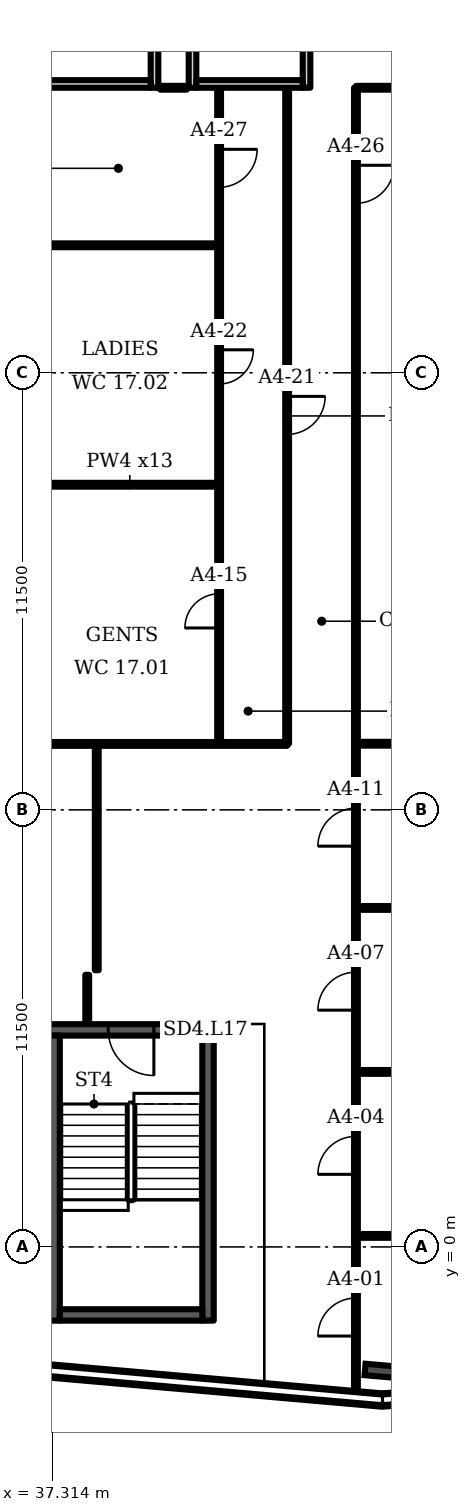
"""IFC4 building model, lengths in metres.
Left out: names, types, materials, properties, quantities, classifications, styles, units other than length and angle.
Written with IfcOpenShell. Run it as: python <this file> out.ifc"""

import sys

from ifc_helpers import new_model, si_unit, direction, frame, frame_2d, origin, origin_2d, place, context, subcontext, project, spatial, rectangle, i_section, extrude, element, fill, save


model = new_model("IFC4")
c1 = context("Model", 3, precision=1e-05, world=origin(), true_north=direction((0.0, 1.0)))
c2 = subcontext(c1, "Body", "Model", "MODEL_VIEW")
j1 = project(units=[si_unit("LENGTHUNIT", "METRE"), si_unit("PLANEANGLEUNIT", "RADIAN")], contexts=[c1])
p1 = place(None, origin())
s1 = spatial("IfcSite", under=j1, at=p1, CompositionType="ELEMENT")
p2 = place(p1, origin())
s2 = spatial("IfcBuilding", under=s1, at=p2, CompositionType="ELEMENT")
p3 = place(p2, frame((0.0, 0.0, 81.1)))
s3 = spatial("IfcBuildingStorey", under=s2, at=p3, CompositionType="ELEMENT", Elevation=81.1)
p4 = place(p3, frame((46.042, -3.268, 0.0), z_axis=(0.0, 0.0, 1.0), x_axis=(-0.087156, -0.996198, 0.0)))
e1 = element("IfcColumn", 1, at=p4, inside=s3, PredefinedType="COLUMN", context=c2, shape_type="SweptSolid", body=[
    extrude(i_section(OverallWidth=0.302, OverallDepth=1.008, WebThickness=0.021, FlangeThickness=0.04, FilletRadius=0.03, at=origin_2d()), origin(), (0.0, 0.0, 1.0), 3.6),
])
p5 = place(p3, frame((34.601, -3.032, 0.0), z_axis=(0.0, 0.0, 1.0), x_axis=(0.996193, -0.087148, 0.0)))
e2 = element("IfcWall", 2, at=p5, inside=s3, PredefinedType="SOLIDWALL", context=c2, shape_type="SweptSolid", body=[
    extrude(rectangle(XDim=11.458, YDim=0.35, at=frame_2d((5.729, 0.0))), origin(), (0.0, 0.0, 1.0), 1.0),
])
p6 = place(p3, frame((46.045, -4.026, 0.0), z_axis=(0.0, 0.0, 1.0), x_axis=(0.99619, 0.087163, 0.0)))
e3 = element("IfcWall", 3, at=p6, inside=s3, PredefinedType="SOLIDWALL", context=c2, shape_type="SweptSolid", body=[
    extrude(rectangle(XDim=23.013, YDim=0.35, at=frame_2d((11.506, 0.0))), origin(), (0.0, 0.0, 1.0), 1.0),
])
p7 = place(p3, frame((40.0, 30.5, 0.0), z_axis=(0.0, 0.0, 1.0), x_axis=(0.0, 1.0, 0.0)))
e4 = element("IfcWall", 4, at=p7, inside=s3, PredefinedType="PARTITIONING", context=c2, shape_type="SweptSolid", body=[
    extrude(rectangle(XDim=3.5, YDim=0.2, at=frame_2d((1.75, 0.0))), origin(), (0.0, 0.0, 1.0), 3.2),
])
p8 = place(p3, frame((37.1, 30.6, 0.0), z_axis=(0.0, 0.0, 1.0), x_axis=(1.0, 0.0, 0.0)))
e5 = element("IfcWall", 5, at=p8, inside=s3, PredefinedType="PARTITIONING", context=c2, shape_type="SweptSolid", body=[
    extrude(rectangle(XDim=2.8, YDim=0.2, at=frame_2d((1.4, 0.0))), origin(), (0.0, 0.0, 1.0), 3.2),
])
p9 = place(p3, frame((41.0, 30.5, 0.0), z_axis=(0.0, 0.0, 1.0), x_axis=(0.0, 1.0, 0.0)))
e6 = element("IfcWall", 6, at=p9, inside=s3, PredefinedType="PARTITIONING", context=c2, shape_type="SweptSolid", body=[
    extrude(rectangle(XDim=3.5, YDim=0.2, at=frame_2d((1.75, 0.0))), origin(), (0.0, 0.0, 1.0), 3.2),
])
p10 = place(p3, frame((44.0, 30.5, 0.0), z_axis=(0.0, 0.0, 1.0), x_axis=(0.0, 1.0, 0.0)))
e7 = element("IfcWall", 7, at=p10, inside=s3, PredefinedType="PARTITIONING", context=c2, shape_type="SweptSolid", body=[
    extrude(rectangle(XDim=3.5, YDim=0.2, at=frame_2d((1.75, 0.0))), origin(), (0.0, 0.0, 1.0), 3.2),
])
p11 = place(p10, frame((1.2, 0.0, 0.0)))
e8 = element("IfcOpeningElement", 8, at=p11, cuts=e7, PredefinedType="OPENING", context=c2, shape_type="SweptSolid", body=[
    extrude(rectangle(XDim=1.1, YDim=2.1, at=frame_2d((0.55, 1.05))), frame((0.0, 0.11, 0.0), z_axis=(0.0, -1.0, 0.0), x_axis=(1.0, 0.0, 0.0)), (0.0, 0.0, 1.0), 0.22),
])
p12 = place(p3, frame((41.1, 30.6, 0.0), z_axis=(0.0, 0.0, 1.0), x_axis=(1.0, 0.0, 0.0)))
e9 = element("IfcWall", 9, at=p12, inside=s3, PredefinedType="PARTITIONING", context=c2, shape_type="SweptSolid", body=[
    extrude(rectangle(XDim=2.8, YDim=0.2, at=frame_2d((1.4, 0.0))), origin(), (0.0, 0.0, 1.0), 3.2),
])
p13 = place(p3, frame((37.208, 5.711, 0.0), z_axis=(0.0, 0.0, 1.0), x_axis=(1.0, 0.0, 0.0)))
e10 = element("IfcWall", 10, at=p13, inside=s3, PredefinedType="SHEAR", context=c2, shape_type="SweptSolid", body=[
    extrude(rectangle(XDim=4.35, YDim=0.3, at=frame_2d((2.175, 0.0))), origin(), (0.0, 0.0, 1.0), 3.2),
])
p14 = place(p13, frame((1.575, 0.0, 0.0)))
e11 = element("IfcOpeningElement", 11, at=p14, cuts=e10, PredefinedType="OPENING", context=c2, shape_type="SweptSolid", body=[
    extrude(rectangle(XDim=1.2, YDim=2.1, at=frame_2d((0.6, 1.05))), frame((0.0, 0.16, 0.0), z_axis=(0.0, -1.0, 0.0), x_axis=(1.0, 0.0, 0.0)), (0.0, 0.0, 1.0), 0.32),
])
p15 = place(p3, frame((37.0, 13.235, 0.0), z_axis=(0.0, 0.0, 1.0), x_axis=(1.0, 0.0, 0.0)))
e12 = element("IfcWall", 12, at=p15, inside=s3, PredefinedType="PARTITIONING", context=c2, shape_type="SweptSolid", body=[
    extrude(rectangle(XDim=6.49, YDim=0.1, at=frame_2d((3.245, 0.0))), origin(), (0.0, 0.0, 1.0), 3.2),
])
for number, where, z_axis, x_axis in (
    (13, (37.0, 20.055, 0.0), (0.0, 0.0, 1.0), (1.0, 0.0, 0.0)),
    (14, (37.0, 26.355, 0.0), (0.0, 0.0, 1.0), (1.0, 0.0, 0.0)),
):
    element("IfcWall", number, at=place(p3, frame(where, z_axis=z_axis, x_axis=x_axis)), inside=s3, PredefinedType="PARTITIONING", context=c2, shape_type="SweptSolid", body=[
        extrude(rectangle(XDim=4.7, YDim=0.1, at=frame_2d((2.35, 0.0))), origin(), (0.0, 0.0, 1.0), 3.2),
    ])
p16 = place(p3, frame((38.23, 5.881, 0.0), z_axis=(0.0, 0.0, 1.0), x_axis=(0.0, 1.0, 0.0)))
e15 = element("IfcWall", 15, at=p16, inside=s3, PredefinedType="PARTITIONING", context=c2, shape_type="SweptSolid", body=[
    extrude(rectangle(XDim=1.279, YDim=0.1, at=frame_2d((0.64, 0.0))), origin(), (0.0, 0.0, 1.0), 3.2),
])
p17 = place(p3, frame((38.48, 7.28, 0.0), z_axis=(0.0, 0.0, 1.0), x_axis=(0.0, 1.0, 0.0)))
e16 = element("IfcWall", 16, at=p17, inside=s3, PredefinedType="PARTITIONING", context=c2, shape_type="SweptSolid", body=[
    extrude(rectangle(XDim=5.955, YDim=0.1, at=frame_2d((2.978, 0.0))), origin(), (0.0, 0.0, 1.0), 3.2),
])
p18 = place(p3, frame((41.7, 13.24, 0.0), z_axis=(0.0, 0.0, 1.0), x_axis=(0.0, 1.0, 0.0)))
e17 = element("IfcWall", 17, at=p18, inside=s3, PredefinedType="PARTITIONING", context=c2, shape_type="SweptSolid", body=[
    extrude(rectangle(XDim=17.25, YDim=0.1, at=frame_2d((8.625, 0.0))), origin(), (0.0, 0.0, 1.0), 3.2),
])
p19 = place(p18, frame((3.046, 0.0, 0.0)))
e18 = element("IfcOpeningElement", 18, at=p19, cuts=e17, PredefinedType="OPENING", context=c2, shape_type="SweptSolid", body=[
    extrude(rectangle(XDim=0.9, YDim=2.1, at=frame_2d((0.45, 1.05))), frame((0.0, 0.06, 0.0), z_axis=(0.0, -1.0, 0.0), x_axis=(1.0, 0.0, 0.0)), (0.0, 0.0, 1.0), 0.12),
])
p20 = place(p18, frame((9.465, 0.0, 0.0)))
e19 = element("IfcOpeningElement", 19, at=p20, cuts=e17, PredefinedType="OPENING", context=c2, shape_type="SweptSolid", body=[
    extrude(rectangle(XDim=0.9, YDim=2.1, at=frame_2d((0.45, 1.05))), frame((0.0, 0.06, 0.0), z_axis=(0.0, -1.0, 0.0), x_axis=(1.0, 0.0, 0.0)), (0.0, 0.0, 1.0), 0.12),
])
p21 = place(p18, frame((14.64, 0.0, 0.0)))
e20 = element("IfcOpeningElement", 20, at=p21, cuts=e17, PredefinedType="OPENING", context=c2, shape_type="SweptSolid", body=[
    extrude(rectangle(XDim=1.0, YDim=2.1, at=frame_2d((0.5, 1.05))), frame((0.0, 0.06, 0.0), z_axis=(0.0, -1.0, 0.0), x_axis=(1.0, 0.0, 0.0)), (0.0, 0.0, 1.0), 0.12),
])
p22 = place(p3, frame((43.49, 13.24, 0.0), z_axis=(0.0, 0.0, 1.0), x_axis=(0.0, 1.0, 0.0)))
e21 = element("IfcWall", 21, at=p22, inside=s3, PredefinedType="PARTITIONING", context=c2, shape_type="SweptSolid", body=[
    extrude(rectangle(XDim=17.25, YDim=0.1, at=frame_2d((8.625, 0.0))), origin(), (0.0, 0.0, 1.0), 3.2),
])
p23 = place(p22, frame((8.139, 0.0, 0.0)))
e22 = element("IfcOpeningElement", 22, at=p23, cuts=e21, PredefinedType="OPENING", context=c2, shape_type="SweptSolid", body=[
    extrude(rectangle(XDim=1.0, YDim=2.1, at=frame_2d((0.5, 1.05))), frame((0.0, 0.06, 0.0), z_axis=(0.0, -1.0, 0.0), x_axis=(1.0, 0.0, 0.0)), (0.0, 0.0, 1.0), 0.12),
])
p24 = place(p3, frame((45.3, -3.943, 0.0), z_axis=(0.0, 0.0, 1.0), x_axis=(0.0, 1.0, 0.0)))
e23 = element("IfcWall", 23, at=p24, inside=s3, PredefinedType="PARTITIONING", context=c2, shape_type="SweptSolid", body=[
    extrude(rectangle(XDim=34.443, YDim=0.1, at=frame_2d((17.222, 0.0))), origin(), (0.0, 0.0, 1.0), 2.58),
])
p25 = place(p24, frame((1.598, 0.0, 0.0)))
e24 = element("IfcOpeningElement", 24, at=p25, cuts=e23, PredefinedType="OPENING", context=c2, shape_type="SweptSolid", body=[
    extrude(rectangle(XDim=1.0, YDim=2.1, at=frame_2d((0.5, 1.05))), frame((0.0, 0.06, 0.0), z_axis=(0.0, -1.0, 0.0), x_axis=(1.0, 0.0, 0.0)), (0.0, 0.0, 1.0), 0.12),
])
p26 = place(p24, frame((5.853, 0.0, 0.0)))
e25 = element("IfcOpeningElement", 25, at=p26, cuts=e23, PredefinedType="OPENING", context=c2, shape_type="SweptSolid", body=[
    extrude(rectangle(XDim=1.0, YDim=2.1, at=frame_2d((0.5, 1.05))), frame((0.0, 0.06, 0.0), z_axis=(0.0, -1.0, 0.0), x_axis=(1.0, 0.0, 0.0)), (0.0, 0.0, 1.0), 0.12),
])
p27 = place(p24, frame((10.173, 0.0, 0.0)))
e26 = element("IfcOpeningElement", 26, at=p27, cuts=e23, PredefinedType="OPENING", context=c2, shape_type="SweptSolid", body=[
    extrude(rectangle(XDim=1.0, YDim=2.1, at=frame_2d((0.5, 1.05))), frame((0.0, 0.06, 0.0), z_axis=(0.0, -1.0, 0.0), x_axis=(1.0, 0.0, 0.0)), (0.0, 0.0, 1.0), 0.12),
])
p28 = place(p24, frame((14.488, 0.0, 0.0)))
e27 = element("IfcOpeningElement", 27, at=p28, cuts=e23, PredefinedType="OPENING", context=c2, shape_type="SweptSolid", body=[
    extrude(rectangle(XDim=1.0, YDim=2.1, at=frame_2d((0.5, 1.05))), frame((0.0, 0.06, 0.0), z_axis=(0.0, -1.0, 0.0), x_axis=(1.0, 0.0, 0.0)), (0.0, 0.0, 1.0), 0.12),
])
p29 = place(p24, frame((31.403, 0.0, 0.0)))
e28 = element("IfcOpeningElement", 28, at=p29, cuts=e23, PredefinedType="OPENING", context=c2, shape_type="SweptSolid", body=[
    extrude(rectangle(XDim=1.0, YDim=2.1, at=frame_2d((0.5, 1.05))), frame((0.0, 0.06, 0.0), z_axis=(0.0, -1.0, 0.0), x_axis=(1.0, 0.0, 0.0)), (0.0, 0.0, 1.0), 0.12),
])
for number, where, z_axis, x_axis in (
    (29, (45.3, 0.29, 0.0), (0.0, 0.0, 1.0), (1.0, 0.0, 0.0)),
    (30, (45.3, 4.605, 0.0), (0.0, 0.0, 1.0), (1.0, 0.0, 0.0)),
    (31, (45.3, 8.92, 0.0), (0.0, 0.0, 1.0), (1.0, 0.0, 0.0)),
):
    element("IfcWall", number, at=place(p3, frame(where, z_axis=z_axis, x_axis=x_axis)), inside=s3, PredefinedType="PARTITIONING", context=c2, shape_type="SweptSolid", body=[
        extrude(rectangle(XDim=17.95, YDim=0.1, at=frame_2d((8.975, 0.0))), origin(), (0.0, 0.0, 1.0), 3.2),
    ])
p30 = place(p3, frame((45.3, 13.24, 0.0), z_axis=(0.0, 0.0, 1.0), x_axis=(1.0, 0.0, 0.0)))
e32 = element("IfcWall", 32, at=p30, inside=s3, PredefinedType="PARTITIONING", context=c2, shape_type="SweptSolid", body=[
    extrude(rectangle(XDim=27.56, YDim=0.1, at=frame_2d((13.78, 0.0))), origin(), (0.0, 0.0, 1.0), 3.2),
])
p31 = place(p3, frame((45.3, 30.5, 0.0), z_axis=(0.0, 0.0, 1.0), x_axis=(1.0, 0.0, 0.0)))
e33 = element("IfcWall", 33, at=p31, inside=s3, PredefinedType="PARTITIONING", context=c2, shape_type="SweptSolid", body=[
    extrude(rectangle(XDim=19.7, YDim=0.1, at=frame_2d((9.85, 0.0))), origin(), (0.0, 0.0, 1.0), 3.2),
])
p32 = place(p3, frame((40.15, 30.5, 0.0), z_axis=(0.0, 0.0, 1.0), x_axis=(1.0, 0.0, 0.0)))
e34 = element("IfcWall", 34, at=p32, inside=s3, PredefinedType="PARTITIONING", context=c2, shape_type="SweptSolid", body=[
    extrude(rectangle(XDim=0.7, YDim=0.1, at=frame_2d((0.35, 0.0))), origin(), (0.0, 0.0, 1.0), 3.2),
])
for number, where, z_axis, x_axis in (
    (35, (37.358, -1.939, 0.0), (0.0, 0.0, 1.0), (0.0, 1.0, 0.0)),
    (36, (41.408, -1.939, 0.0), (0.0, 0.0, 1.0), (0.0, 1.0, 0.0)),
):
    element("IfcWall", number, at=place(p3, frame(where, z_axis=z_axis, x_axis=x_axis)), inside=s3, PredefinedType="SHEAR", context=c2, shape_type="SweptSolid", body=[
        extrude(rectangle(XDim=7.5, YDim=0.3, at=frame_2d((3.75, 0.0))), origin(), (0.0, 0.0, 1.0), 3.2),
    ])
p33 = place(p3, frame((37.508, -1.789, 0.0), z_axis=(0.0, 0.0, 1.0), x_axis=(1.0, 0.0, 0.0)))
e37 = element("IfcWall", 37, at=p33, inside=s3, PredefinedType="SHEAR", context=c2, shape_type="SweptSolid", body=[
    extrude(rectangle(XDim=3.75, YDim=0.3, at=frame_2d((1.875, 0.0))), origin(), (0.0, 0.0, 1.0), 3.2),
])
p34 = place(p14, origin())
e38 = element("IfcDoor", 38, at=p34, inside=s3, OperationType="SINGLE_SWING_RIGHT", PredefinedType="DOOR", context=c2, shape_type="SweptSolid", body=[
    extrude(rectangle(XDim=1.2, YDim=2.1, at=frame_2d((0.6, 1.05))), frame((0.0, 0.025, 0.0), z_axis=(0.0, -1.0, 0.0), x_axis=(1.0, 0.0, 0.0)), (0.0, 0.0, 1.0), 0.05),
])
fill(e11, e38)
p35 = place(p25, origin())
e39 = element("IfcDoor", 39, at=p35, inside=s3, OperationType="SINGLE_SWING_LEFT", PredefinedType="DOOR", context=c2, shape_type="SweptSolid", body=[
    extrude(rectangle(XDim=1.0, YDim=2.1, at=frame_2d((0.5, 1.05))), frame((0.0, 0.025, 0.0), z_axis=(0.0, -1.0, 0.0), x_axis=(1.0, 0.0, 0.0)), (0.0, 0.0, 1.0), 0.05),
])
fill(e24, e39)
p36 = place(p26, origin())
e40 = element("IfcDoor", 40, at=p36, inside=s3, OperationType="SINGLE_SWING_LEFT", PredefinedType="DOOR", context=c2, shape_type="SweptSolid", body=[
    extrude(rectangle(XDim=1.0, YDim=2.1, at=frame_2d((0.5, 1.05))), frame((0.0, 0.025, 0.0), z_axis=(0.0, -1.0, 0.0), x_axis=(1.0, 0.0, 0.0)), (0.0, 0.0, 1.0), 0.05),
])
fill(e25, e40)
p37 = place(p27, origin())
e41 = element("IfcDoor", 41, at=p37, inside=s3, OperationType="SINGLE_SWING_LEFT", PredefinedType="DOOR", context=c2, shape_type="SweptSolid", body=[
    extrude(rectangle(XDim=1.0, YDim=2.1, at=frame_2d((0.5, 1.05))), frame((0.0, 0.025, 0.0), z_axis=(0.0, -1.0, 0.0), x_axis=(1.0, 0.0, 0.0)), (0.0, 0.0, 1.0), 0.05),
])
fill(e26, e41)
p38 = place(p28, origin())
e42 = element("IfcDoor", 42, at=p38, inside=s3, OperationType="SINGLE_SWING_LEFT", PredefinedType="DOOR", context=c2, shape_type="SweptSolid", body=[
    extrude(rectangle(XDim=1.0, YDim=2.1, at=frame_2d((0.5, 1.05))), frame((0.0, 0.025, 0.0), z_axis=(0.0, -1.0, 0.0), x_axis=(1.0, 0.0, 0.0)), (0.0, 0.0, 1.0), 0.05),
])
fill(e27, e42)
p39 = place(p19, origin())
e43 = element("IfcDoor", 43, at=p39, inside=s3, OperationType="SINGLE_SWING_LEFT", PredefinedType="DOOR", context=c2, shape_type="SweptSolid", body=[
    extrude(rectangle(XDim=0.9, YDim=2.1, at=frame_2d((0.45, 1.05))), frame((0.0, 0.025, 0.0), z_axis=(0.0, -1.0, 0.0), x_axis=(1.0, 0.0, 0.0)), (0.0, 0.0, 1.0), 0.05),
])
fill(e18, e43)
p40 = place(p23, origin())
e44 = element("IfcDoor", 44, at=p40, inside=s3, OperationType="SINGLE_SWING_RIGHT", PredefinedType="DOOR", context=c2, shape_type="SweptSolid", body=[
    extrude(rectangle(XDim=1.0, YDim=2.1, at=frame_2d((0.5, 1.05))), frame((0.0, 0.025, 0.0), z_axis=(0.0, -1.0, 0.0), x_axis=(1.0, 0.0, 0.0)), (0.0, 0.0, 1.0), 0.05),
])
fill(e22, e44)
p41 = place(p20, origin())
e45 = element("IfcDoor", 45, at=p41, inside=s3, OperationType="SINGLE_SWING_RIGHT", PredefinedType="DOOR", context=c2, shape_type="SweptSolid", body=[
    extrude(rectangle(XDim=0.9, YDim=2.1, at=frame_2d((0.45, 1.05))), frame((0.0, 0.025, 0.0), z_axis=(0.0, -1.0, 0.0), x_axis=(1.0, 0.0, 0.0)), (0.0, 0.0, 1.0), 0.05),
])
fill(e19, e45)
p42 = place(p29, origin())
e46 = element("IfcDoor", 46, at=p42, inside=s3, OperationType="SINGLE_SWING_RIGHT", PredefinedType="DOOR", context=c2, shape_type="SweptSolid", body=[
    extrude(rectangle(XDim=1.0, YDim=2.1, at=frame_2d((0.5, 1.05))), frame((0.0, 0.025, 0.0), z_axis=(0.0, -1.0, 0.0), x_axis=(1.0, 0.0, 0.0)), (0.0, 0.0, 1.0), 0.05),
])
fill(e28, e46)
p43 = place(p21, origin())
e47 = element("IfcDoor", 47, at=p43, inside=s3, OperationType="SINGLE_SWING_RIGHT", PredefinedType="DOOR", context=c2, shape_type="SweptSolid", body=[
    extrude(rectangle(XDim=1.0, YDim=2.1, at=frame_2d((0.5, 1.05))), frame((0.0, 0.025, 0.0), z_axis=(0.0, -1.0, 0.0), x_axis=(1.0, 0.0, 0.0)), (0.0, 0.0, 1.0), 0.05),
])
fill(e20, e47)
save(model, sys.argv[1])
